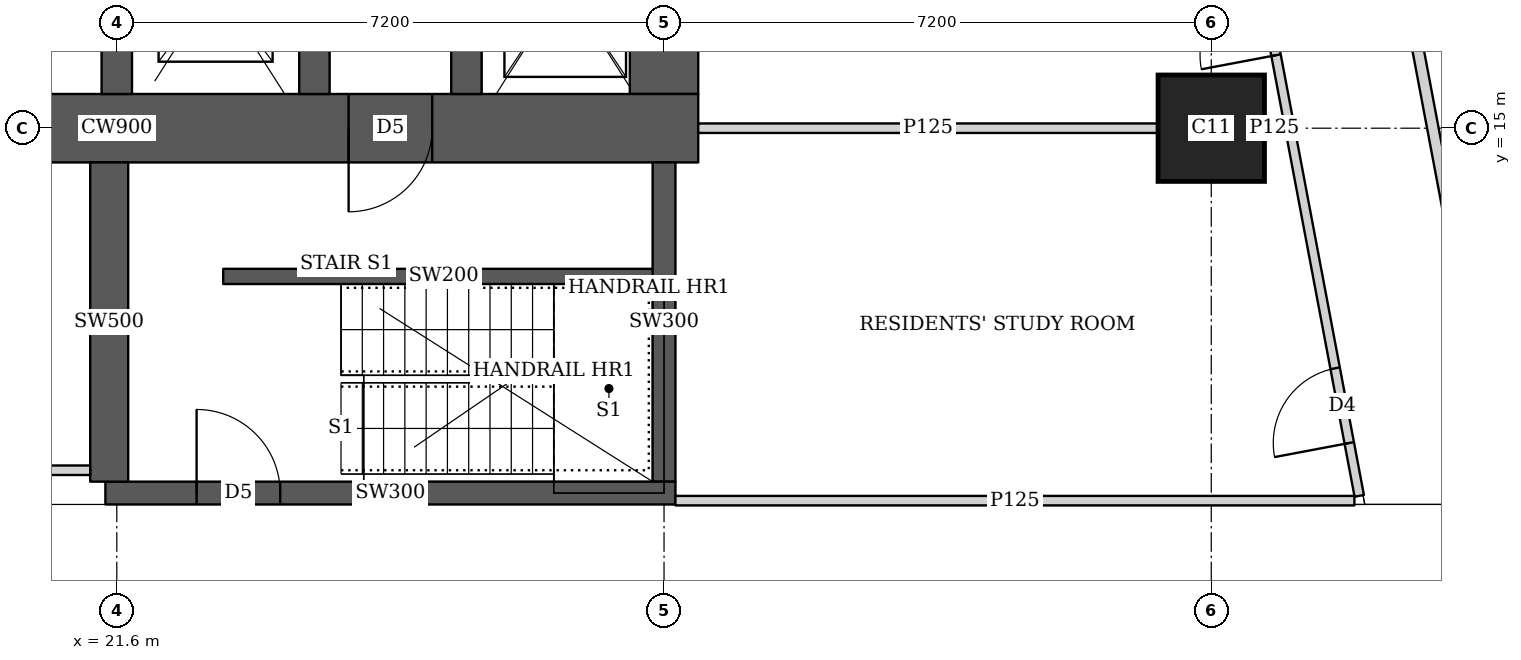
"""IFC4 building model, lengths in metres.
Left out: names, types, materials, properties, quantities, classifications, styles, units other than length and angle.
Written with IfcOpenShell. Run it as: python <this file> out.ifc"""

import sys

from ifc_helpers import new_model, si_unit, direction, frame, frame_2d, origin, origin_2d, place, context, subcontext, project, spatial, rectangle, extrude, element, fill, save


model = new_model("IFC4")
c1 = context("Model", 3, precision=1e-05, world=origin(), true_north=direction((0.0, 1.0)))
c2 = subcontext(c1, "Body", "Model", "MODEL_VIEW")
j1 = project(units=[si_unit("LENGTHUNIT", "METRE"), si_unit("PLANEANGLEUNIT", "RADIAN")], contexts=[c1])
p1 = place(None, origin())
s1 = spatial("IfcSite", under=j1, at=p1, CompositionType="ELEMENT")
p2 = place(p1, origin())
s2 = spatial("IfcBuilding", under=s1, at=p2, CompositionType="ELEMENT")
p3 = place(p2, frame((0.0, 0.0, 274.1)))
s3 = spatial("IfcBuildingStorey", under=s2, at=p3, CompositionType="ELEMENT", Elevation=274.1)
p4 = place(p3, frame((36.0, 15.0, 0.0), z_axis=(0.0, 0.0, 1.0), x_axis=(1.0, 0.0, 0.0)))
e1 = element("IfcColumn", 1, at=p4, inside=s3, PredefinedType="COLUMN", context=c2, shape_type="SweptSolid", body=[
    extrude(rectangle(XDim=1.4, YDim=1.4, at=origin_2d()), origin(), (0.0, 0.0, 1.0), 3.75),
])
p5 = place(p3, frame((13.95, 15.0, 0.0), z_axis=(0.0, 0.0, 1.0), x_axis=(1.0, 0.0, 0.0)))
e2 = element("IfcWall", 2, at=p5, inside=s3, PredefinedType="SHEAR", context=c2, shape_type="SweptSolid", body=[
    extrude(rectangle(XDim=15.3, YDim=0.9, at=frame_2d((7.65, 0.0))), origin(), (0.0, 0.0, 1.0), 3.75),
])
p6 = place(p5, frame((4.45, 0.0, 0.0)))
e3 = element("IfcOpeningElement", 3, at=p6, cuts=e2, PredefinedType="OPENING", context=c2, shape_type="SweptSolid", body=[
    extrude(rectangle(XDim=1.8, YDim=2.1, at=frame_2d((0.9, 1.05))), frame((0.0, 0.46, 0.0), z_axis=(0.0, -1.0, 0.0), x_axis=(1.0, 0.0, 0.0)), (0.0, 0.0, 1.0), 0.92),
])
p7 = place(p5, frame((10.7, 0.0, 0.0)))
e4 = element("IfcOpeningElement", 4, at=p7, cuts=e2, PredefinedType="OPENING", context=c2, shape_type="SweptSolid", body=[
    extrude(rectangle(XDim=1.1, YDim=2.1, at=frame_2d((0.55, 1.05))), frame((0.0, 0.46, 0.0), z_axis=(0.0, -1.0, 0.0), x_axis=(1.0, 0.0, 0.0)), (0.0, 0.0, 1.0), 0.92),
])
p8 = place(p3, frame((28.8, 15.45, 0.0), z_axis=(0.0, 0.0, 1.0), x_axis=(0.0, 1.0, 0.0)))
e5 = element("IfcWall", 5, at=p8, inside=s3, PredefinedType="SHEAR", context=c2, shape_type="SweptSolid", body=[
    extrude(rectangle(XDim=14.1, YDim=0.9, at=frame_2d((7.05, 0.0))), origin(), (0.0, 0.0, 1.0), 3.75),
])
p9 = place(p3, frame((21.6, 15.45, 0.0), z_axis=(0.0, 0.0, 1.0), x_axis=(0.0, 1.0, 0.0)))
e6 = element("IfcWall", 6, at=p9, inside=s3, PredefinedType="SHEAR", context=c2, shape_type="SweptSolid", body=[
    extrude(rectangle(XDim=14.1, YDim=0.4, at=frame_2d((7.05, 0.0))), origin(), (0.0, 0.0, 1.0), 3.75),
])
p10 = place(p9, frame((0.875, 0.0, 0.0)))
e7 = element("IfcOpeningElement", 7, at=p10, cuts=e6, PredefinedType="OPENING", context=c2, shape_type="SweptSolid", body=[
    extrude(rectangle(XDim=1.1, YDim=2.1, at=frame_2d((0.55, 1.05))), frame((0.0, 0.21, 0.0), z_axis=(0.0, -1.0, 0.0), x_axis=(1.0, 0.0, 0.0)), (0.0, 0.0, 1.0), 0.42),
])
p11 = place(p9, frame((4.625, 0.0, 0.0)))
e8 = element("IfcOpeningElement", 8, at=p11, cuts=e6, PredefinedType="OPENING", context=c2, shape_type="SweptSolid", body=[
    extrude(rectangle(XDim=1.1, YDim=2.1, at=frame_2d((0.55, 1.05))), frame((0.0, 0.21, 0.0), z_axis=(0.0, -1.0, 0.0), x_axis=(1.0, 0.0, 0.0)), (0.0, 0.0, 1.0), 0.42),
])
p12 = place(p9, frame((8.375, 0.0, 0.0)))
e9 = element("IfcOpeningElement", 9, at=p12, cuts=e6, PredefinedType="OPENING", context=c2, shape_type="SweptSolid", body=[
    extrude(rectangle(XDim=1.1, YDim=2.1, at=frame_2d((0.55, 1.05))), frame((0.0, 0.21, 0.0), z_axis=(0.0, -1.0, 0.0), x_axis=(1.0, 0.0, 0.0)), (0.0, 0.0, 1.0), 0.42),
])
p13 = place(p9, frame((12.125, 0.0, 0.0)))
e10 = element("IfcOpeningElement", 10, at=p13, cuts=e6, PredefinedType="OPENING", context=c2, shape_type="SweptSolid", body=[
    extrude(rectangle(XDim=1.1, YDim=2.1, at=frame_2d((0.55, 1.05))), frame((0.0, 0.21, 0.0), z_axis=(0.0, -1.0, 0.0), x_axis=(1.0, 0.0, 0.0)), (0.0, 0.0, 1.0), 0.42),
])
p14 = place(p3, frame((24.2, 15.45, 0.0), z_axis=(0.0, 0.0, 1.0), x_axis=(0.0, 1.0, 0.0)))
e11 = element("IfcWall", 11, at=p14, inside=s3, PredefinedType="SHEAR", context=c2, shape_type="SweptSolid", body=[
    extrude(rectangle(XDim=14.1, YDim=0.4, at=frame_2d((7.05, 0.0))), origin(), (0.0, 0.0, 1.0), 3.75),
])
p15 = place(p3, frame((26.2, 15.45, 0.0), z_axis=(0.0, 0.0, 1.0), x_axis=(0.0, 1.0, 0.0)))
e12 = element("IfcWall", 12, at=p15, inside=s3, PredefinedType="SHEAR", context=c2, shape_type="SweptSolid", body=[
    extrude(rectangle(XDim=3.1, YDim=0.4, at=frame_2d((1.55, 0.0))), origin(), (0.0, 0.0, 1.0), 3.75),
])
p16 = place(p15, frame((0.825, 0.0, 0.0)))
e13 = element("IfcOpeningElement", 13, at=p16, cuts=e12, PredefinedType="OPENING", context=c2, shape_type="SweptSolid", body=[
    extrude(rectangle(XDim=1.2, YDim=2.1, at=frame_2d((0.6, 1.05))), frame((0.0, 0.21, 0.0), z_axis=(0.0, -1.0, 0.0), x_axis=(1.0, 0.0, 0.0)), (0.0, 0.0, 1.0), 0.42),
])
p17 = place(p3, frame((21.45, 10.2, 0.0), z_axis=(0.0, 0.0, 1.0), x_axis=(1.0, 0.0, 0.0)))
e14 = element("IfcWall", 14, at=p17, inside=s3, PredefinedType="SHEAR", context=c2, shape_type="SweptSolid", body=[
    extrude(rectangle(XDim=7.5, YDim=0.3, at=frame_2d((3.75, 0.0))), origin(), (0.0, 0.0, 1.0), 3.75),
])
p18 = place(p17, frame((1.2, 0.0, 0.0)))
e15 = element("IfcOpeningElement", 15, at=p18, cuts=e14, PredefinedType="OPENING", context=c2, shape_type="SweptSolid", body=[
    extrude(rectangle(XDim=1.1, YDim=2.1, at=frame_2d((0.55, 1.05))), frame((0.0, 0.16, 0.0), z_axis=(0.0, -1.0, 0.0), x_axis=(1.0, 0.0, 0.0)), (0.0, 0.0, 1.0), 0.32),
])
p19 = place(p3, frame((21.5, 10.35, 0.0), z_axis=(0.0, 0.0, 1.0), x_axis=(0.0, 1.0, 0.0)))
e16 = element("IfcWall", 16, at=p19, inside=s3, PredefinedType="SHEAR", context=c2, shape_type="SweptSolid", body=[
    extrude(rectangle(XDim=4.2, YDim=0.5, at=frame_2d((2.1, 0.0))), origin(), (0.0, 0.0, 1.0), 3.75),
])
p20 = place(p3, frame((28.8, 10.35, 0.0), z_axis=(0.0, 0.0, 1.0), x_axis=(0.0, 1.0, 0.0)))
e17 = element("IfcWall", 17, at=p20, inside=s3, PredefinedType="SHEAR", context=c2, shape_type="SweptSolid", body=[
    extrude(rectangle(XDim=4.2, YDim=0.3, at=frame_2d((2.1, 0.0))), origin(), (0.0, 0.0, 1.0), 3.75),
])
p21 = place(p3, frame((33.781, 42.186, 0.0), z_axis=(0.0, 0.0, 1.0), x_axis=(0.185593518645, -0.9826266055, 0.0)))
e18 = element("IfcWall", 18, at=p21, inside=s3, PredefinedType="SOLIDWALL", context=c2, shape_type="SweptSolid", body=[
    extrude(rectangle(XDim=35.961, YDim=0.15, at=frame_2d((17.98, 0.0))), origin(), (0.0, 0.0, 1.0), 2.5),
])
p22 = place(p21, frame((11.76, 0.0, 0.0)))
e19 = element("IfcOpeningElement", 19, at=p22, cuts=e18, PredefinedType="OPENING", context=c2, shape_type="SweptSolid", body=[
    extrude(rectangle(XDim=1.0, YDim=2.1, at=frame_2d((0.5, 1.05))), frame((0.0, 0.085, 0.0), z_axis=(0.0, -1.0, 0.0), x_axis=(1.0, 0.0, 0.0)), (0.0, 0.0, 1.0), 0.17),
])
p23 = place(p21, frame((15.576, 0.0, 0.0)))
e20 = element("IfcOpeningElement", 20, at=p23, cuts=e18, PredefinedType="OPENING", context=c2, shape_type="SweptSolid", body=[
    extrude(rectangle(XDim=1.0, YDim=2.1, at=frame_2d((0.5, 1.05))), frame((0.0, 0.085, 0.0), z_axis=(0.0, -1.0, 0.0), x_axis=(1.0, 0.0, 0.0)), (0.0, 0.0, 1.0), 0.17),
])
p24 = place(p21, frame((30.502, 0.0, 0.0)))
e21 = element("IfcOpeningElement", 21, at=p24, cuts=e18, PredefinedType="OPENING", context=c2, shape_type="SweptSolid", body=[
    extrude(rectangle(XDim=1.0, YDim=2.1, at=frame_2d((0.5, 1.05))), frame((0.0, 0.085, 0.0), z_axis=(0.0, -1.0, 0.0), x_axis=(1.0, 0.0, 0.0)), (0.0, 0.0, 1.0), 0.17),
])
p25 = place(p3, frame((13.75, 10.5, 0.0), z_axis=(0.0, 0.0, 1.0), x_axis=(1.0, 0.0, 0.0)))
e22 = element("IfcWall", 22, at=p25, inside=s3, PredefinedType="PARTITIONING", context=c2, shape_type="SweptSolid", body=[
    extrude(rectangle(XDim=7.5, YDim=0.125, at=frame_2d((3.75, 0.0))), origin(), (0.0, 0.0, 1.0), 3.5),
])
p26 = place(p25, frame((4.245, 0.0, 0.0)))
e23 = element("IfcOpeningElement", 23, at=p26, cuts=e22, PredefinedType="OPENING", context=c2, shape_type="SweptSolid", body=[
    extrude(rectangle(XDim=1.8, YDim=2.1, at=frame_2d((0.9, 1.05))), frame((0.0, 0.073, 0.0), z_axis=(0.0, -1.0, 0.0), x_axis=(1.0, 0.0, 0.0)), (0.0, 0.0, 1.0), 0.145),
])
p27 = place(p3, frame((28.95, 10.1, 0.0), z_axis=(0.0, 0.0, 1.0), x_axis=(1.0, 0.0, 0.0)))
e24 = element("IfcWall", 24, at=p27, inside=s3, PredefinedType="PARTITIONING", context=c2, shape_type="SweptSolid", body=[
    extrude(rectangle(XDim=8.933, YDim=0.125, at=frame_2d((4.467, 0.0))), origin(), (0.0, 0.0, 1.0), 3.5),
])
p28 = place(p3, frame((37.947, 10.163, 0.0), z_axis=(0.0, 0.0, 1.0), x_axis=(-0.185572770922, 0.982630523998, 0.0)))
e25 = element("IfcWall", 25, at=p28, inside=s3, PredefinedType="PARTITIONING", context=c2, shape_type="SweptSolid", body=[
    extrude(rectangle(XDim=25.111, YDim=0.125, at=frame_2d((12.556, 0.0))), origin(), (0.0, 0.0, 1.0), 2.5),
])
p29 = place(p28, frame((0.708, 0.0, 0.0)))
e26 = element("IfcOpeningElement", 26, at=p29, cuts=e25, PredefinedType="OPENING", context=c2, shape_type="SweptSolid", body=[
    extrude(rectangle(XDim=1.0, YDim=2.1, at=frame_2d((0.5, 1.05))), frame((0.0, 0.073, 0.0), z_axis=(0.0, -1.0, 0.0), x_axis=(1.0, 0.0, 0.0)), (0.0, 0.0, 1.0), 0.145),
])
p30 = place(p28, frame((5.9, 0.0, 0.0)))
e27 = element("IfcOpeningElement", 27, at=p30, cuts=e25, PredefinedType="OPENING", context=c2, shape_type="SweptSolid", body=[
    extrude(rectangle(XDim=1.0, YDim=2.1, at=frame_2d((0.5, 1.05))), frame((0.0, 0.073, 0.0), z_axis=(0.0, -1.0, 0.0), x_axis=(1.0, 0.0, 0.0)), (0.0, 0.0, 1.0), 0.145),
])
p31 = place(p28, frame((13.378, 0.0, 0.0)))
e28 = element("IfcOpeningElement", 28, at=p31, cuts=e25, PredefinedType="OPENING", context=c2, shape_type="SweptSolid", body=[
    extrude(rectangle(XDim=1.0, YDim=2.1, at=frame_2d((0.5, 1.05))), frame((0.0, 0.073, 0.0), z_axis=(0.0, -1.0, 0.0), x_axis=(1.0, 0.0, 0.0)), (0.0, 0.0, 1.0), 0.145),
])
p32 = place(p28, frame((21.15, 0.0, 0.0)))
e29 = element("IfcOpeningElement", 29, at=p32, cuts=e25, PredefinedType="OPENING", context=c2, shape_type="SweptSolid", body=[
    extrude(rectangle(XDim=1.0, YDim=2.1, at=frame_2d((0.5, 1.05))), frame((0.0, 0.073, 0.0), z_axis=(0.0, -1.0, 0.0), x_axis=(1.0, 0.0, 0.0)), (0.0, 0.0, 1.0), 0.145),
])
p33 = place(p3, frame((29.25, 15.0, 0.0), z_axis=(0.0, 0.0, 1.0), x_axis=(1.0, 0.0, 0.0)))
e30 = element("IfcWall", 30, at=p33, inside=s3, PredefinedType="PARTITIONING", context=c2, shape_type="SweptSolid", body=[
    extrude(rectangle(XDim=6.049, YDim=0.125, at=frame_2d((3.024, 0.0))), origin(), (0.0, 0.0, 1.0), 3.5),
])
p34 = place(p3, frame((36.701, 15.0, 0.0), z_axis=(0.0, 0.0, 1.0), x_axis=(1.0, 0.0, 0.0)))
e31 = element("IfcWall", 31, at=p34, inside=s3, PredefinedType="PARTITIONING", context=c2, shape_type="SweptSolid", body=[
    extrude(rectangle(XDim=0.257, YDim=0.125, at=frame_2d((0.128, 0.0))), origin(), (0.0, 0.0, 1.0), 3.5),
])
p35 = place(p3, frame((23.0, 13.05, 0.0), z_axis=(0.0, 0.0, 1.0), x_axis=(1.0, 0.0, 0.0)))
e32 = element("IfcWall", 32, at=p35, inside=s3, PredefinedType="SHEAR", context=c2, shape_type="SweptSolid", body=[
    extrude(rectangle(XDim=5.8, YDim=0.2, at=frame_2d((2.9, 0.0))), origin(), (0.0, 0.0, 1.0), 3.75),
])
p36 = place(p29, origin())
e33 = element("IfcDoor", 33, at=p36, inside=s3, OperationType="SINGLE_SWING_LEFT", PredefinedType="DOOR", context=c2, shape_type="SweptSolid", body=[
    extrude(rectangle(XDim=1.0, YDim=2.1, at=frame_2d((0.5, 1.05))), frame((0.0, 0.025, 0.0), z_axis=(0.0, -1.0, 0.0), x_axis=(1.0, 0.0, 0.0)), (0.0, 0.0, 1.0), 0.05),
])
fill(e26, e33)
p37 = place(p30, origin())
e34 = element("IfcDoor", 34, at=p37, inside=s3, OperationType="SINGLE_SWING_LEFT", PredefinedType="DOOR", context=c2, shape_type="SweptSolid", body=[
    extrude(rectangle(XDim=1.0, YDim=2.1, at=frame_2d((0.5, 1.05))), frame((0.0, 0.025, 0.0), z_axis=(0.0, -1.0, 0.0), x_axis=(1.0, 0.0, 0.0)), (0.0, 0.0, 1.0), 0.05),
])
fill(e27, e34)
p38 = place(p7, origin())
e35 = element("IfcDoor", 35, at=p38, inside=s3, OperationType="SINGLE_SWING_RIGHT", PredefinedType="DOOR", context=c2, shape_type="SweptSolid", body=[
    extrude(rectangle(XDim=1.1, YDim=2.1, at=frame_2d((0.55, 1.05))), frame((0.0, 0.025, 0.0), z_axis=(0.0, -1.0, 0.0), x_axis=(1.0, 0.0, 0.0)), (0.0, 0.0, 1.0), 0.05),
])
fill(e4, e35)
p39 = place(p18, origin())
e36 = element("IfcDoor", 36, at=p39, inside=s3, OperationType="SINGLE_SWING_LEFT", PredefinedType="DOOR", context=c2, shape_type="SweptSolid", body=[
    extrude(rectangle(XDim=1.1, YDim=2.1, at=frame_2d((0.55, 1.05))), frame((0.0, 0.025, 0.0), z_axis=(0.0, -1.0, 0.0), x_axis=(1.0, 0.0, 0.0)), (0.0, 0.0, 1.0), 0.05),
])
fill(e15, e36)
save(model, sys.argv[1])
